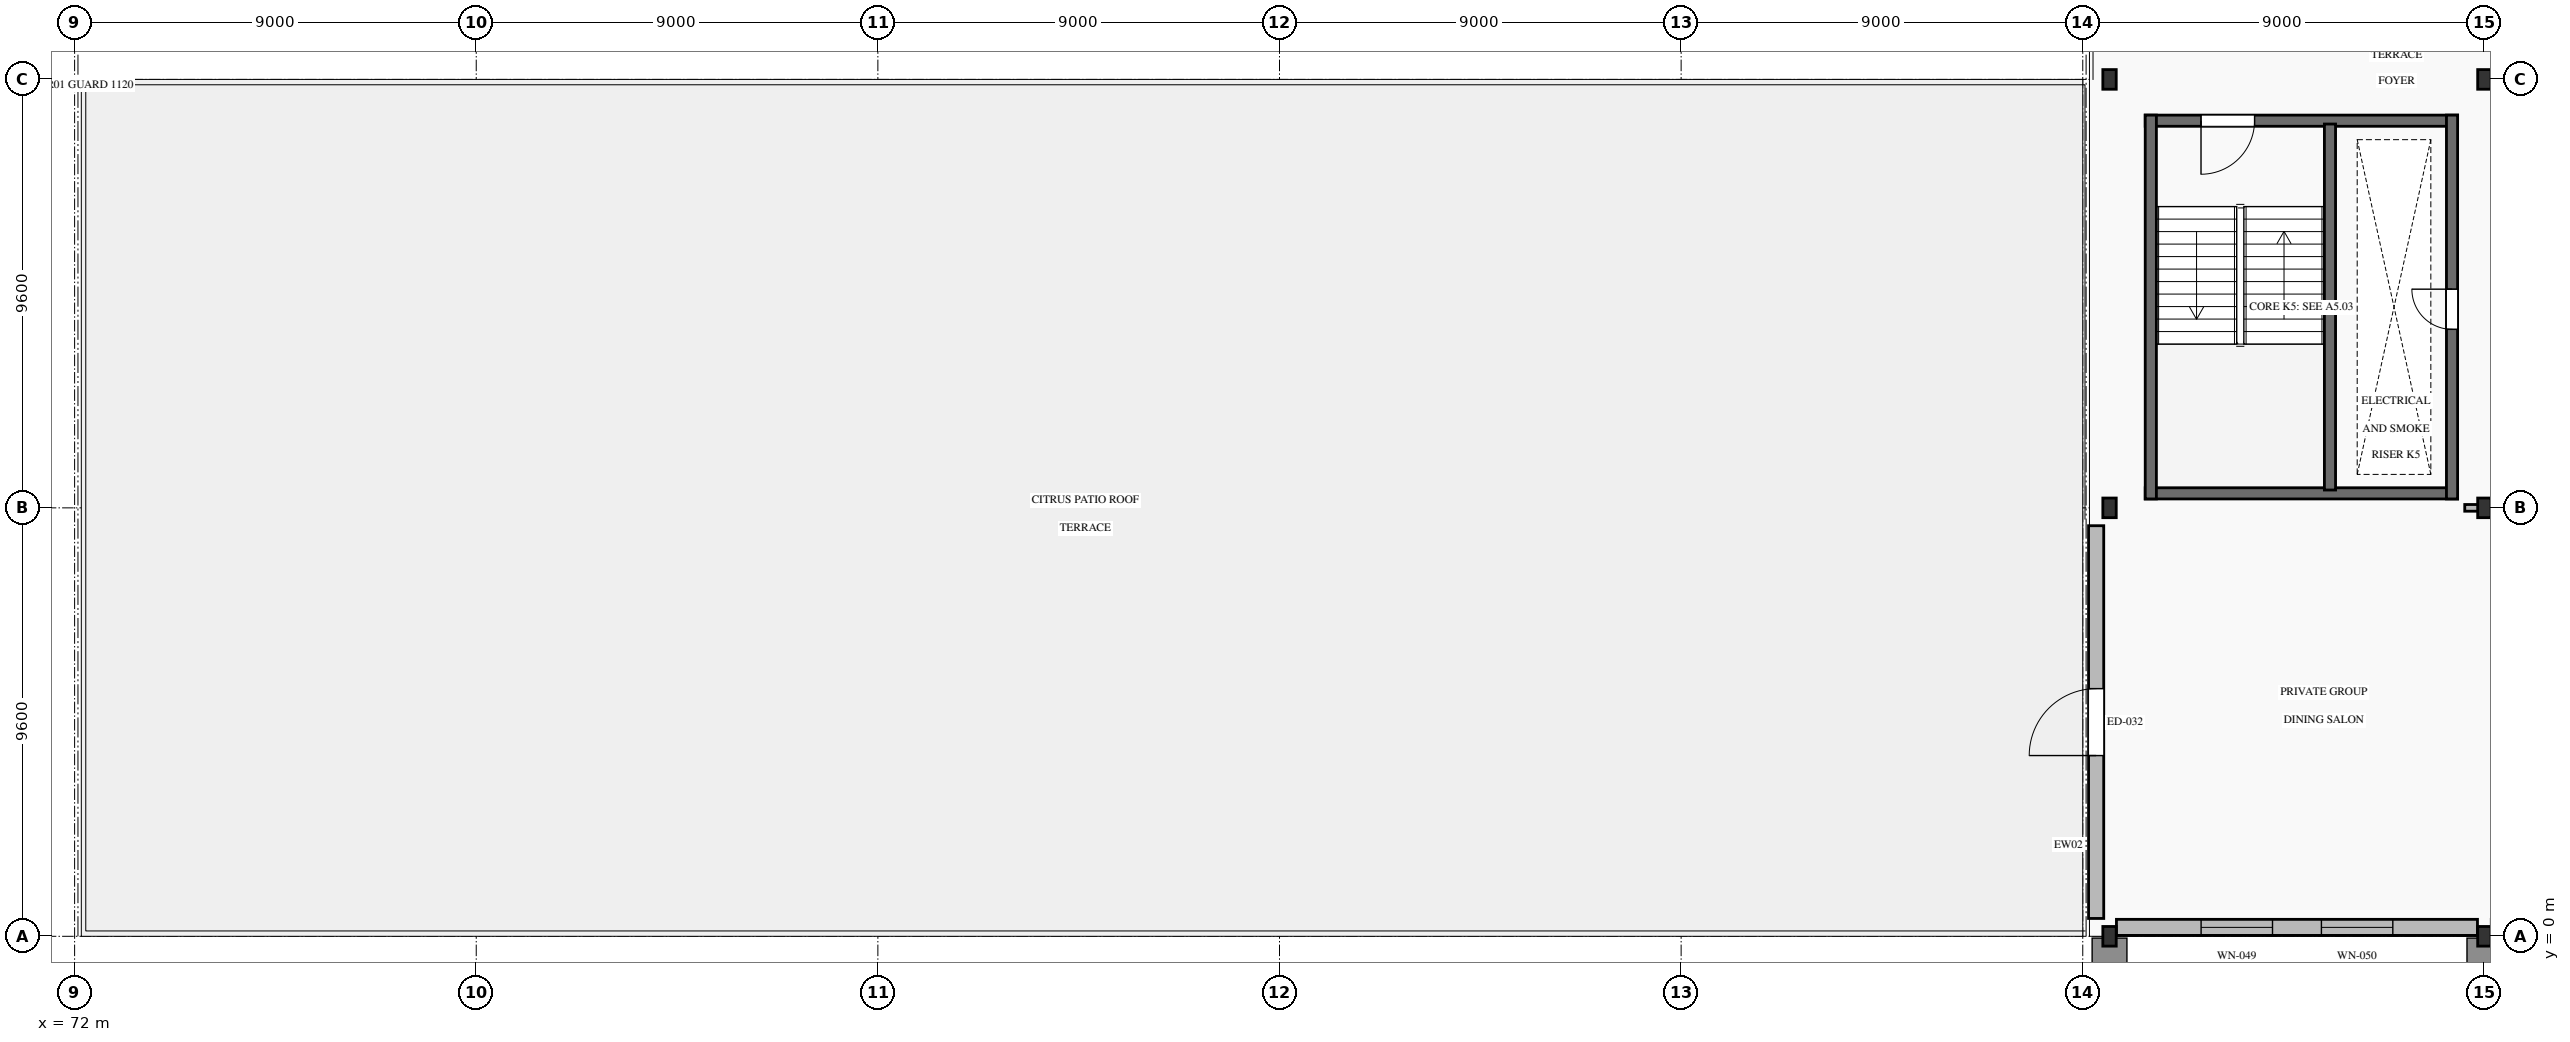
"""IFC4 building model, lengths in metres.
Left out: names, types, materials, properties, quantities, classifications, styles, units other than length and angle.
Written with IfcOpenShell. Run it as: python <this file> out.ifc"""

import sys

from ifc_helpers import new_model, si_unit, direction, frame, frame_2d, origin, origin_2d, place, context, subcontext, project, spatial, rectangle, i_section, extrude, element, fill, save


model = new_model("IFC4")
c1 = context("Model", 3, precision=1e-05, world=origin(), true_north=direction((0.0, 1.0)))
c2 = subcontext(c1, "Body", "Model", "MODEL_VIEW")
j1 = project(units=[si_unit("LENGTHUNIT", "METRE"), si_unit("PLANEANGLEUNIT", "RADIAN")], contexts=[c1])
p1 = place(None, origin())
s1 = spatial("IfcSite", under=j1, at=p1, CompositionType="ELEMENT")
p2 = place(p1, origin())
s2 = spatial("IfcBuilding", under=s1, at=p2, CompositionType="ELEMENT")
p3 = place(p2, frame((0.0, 0.0, 10.8)))
s3 = spatial("IfcBuildingStorey", under=s2, at=p3, CompositionType="ELEMENT", Elevation=10.8)
for number, where, z_axis, x_axis in (
    (1, (117.6, 0.0, 0.0), (0.0, 0.0, 1.0), (1.0, 0.0, 0.0)),
    (2, (117.6, 9.6, 0.0), (0.0, 0.0, 1.0), (1.0, 0.0, 0.0)),
    (3, (117.6, 19.2, 0.0), (0.0, 0.0, 1.0), (1.0, 0.0, 0.0)),
    (4, (126.0, 0.0, 0.0), (0.0, 0.0, 1.0), (1.0, 0.0, 0.0)),
    (5, (126.0, 9.6, 0.0), (0.0, 0.0, 1.0), (1.0, 0.0, 0.0)),
    (6, (126.0, 19.2, 0.0), (0.0, 0.0, 1.0), (1.0, 0.0, 0.0)),
):
    element("IfcColumn", number, at=place(p3, frame(where, z_axis=z_axis, x_axis=x_axis)), inside=s3, PredefinedType="COLUMN", context=c2, shape_type="SweptSolid", body=[
        extrude(i_section(OverallWidth=0.3, OverallDepth=0.44, WebThickness=0.011, FlangeThickness=0.021, FilletRadius=0.027, at=origin_2d()), origin(), (0.0, 0.0, 1.0), 4.2),
    ])
p4 = place(p3, frame((117.755, 0.2, 0.0), z_axis=(0.0, 0.0, 1.0), x_axis=(1.0, 0.0, 0.0)))
e7 = element("IfcWall", 7, at=p4, inside=s3, PredefinedType="SOLIDWALL", context=c2, shape_type="SweptSolid", body=[
    extrude(rectangle(XDim=8.09, YDim=0.36, at=frame_2d((4.045, 0.0))), origin(), (0.0, 0.0, 1.0), 3.69),
])
p5 = place(p4, frame((1.897, 0.0, 0.95)))
e8 = element("IfcOpeningElement", 8, at=p5, cuts=e7, PredefinedType="OPENING", context=c2, shape_type="SweptSolid", body=[
    extrude(rectangle(XDim=1.6, YDim=2.2, at=frame_2d((0.8, 1.1))), frame((0.0, 0.195, 0.0), z_axis=(0.0, -1.0, 0.0), x_axis=(1.0, 0.0, 0.0)), (0.0, 0.0, 1.0), 0.39),
])
p6 = place(p4, frame((4.593, 0.0, 0.95)))
e9 = element("IfcOpeningElement", 9, at=p6, cuts=e7, PredefinedType="OPENING", context=c2, shape_type="SweptSolid", body=[
    extrude(rectangle(XDim=1.6, YDim=2.2, at=frame_2d((0.8, 1.1))), frame((0.0, 0.195, 0.0), z_axis=(0.0, -1.0, 0.0), x_axis=(1.0, 0.0, 0.0)), (0.0, 0.0, 1.0), 0.39),
])
p7 = place(p3, frame((117.3, 0.4, 0.0), z_axis=(0.0, 0.0, 1.0), x_axis=(0.0, 1.0, 0.0)))
e10 = element("IfcWall", 10, at=p7, inside=s3, PredefinedType="SOLIDWALL", context=c2, shape_type="SweptSolid", body=[
    extrude(rectangle(XDim=8.8, YDim=0.34, at=frame_2d((4.4, 0.0))), origin(), (0.0, 0.0, 1.0), 3.49),
])
p8 = place(p7, frame((3.65, 0.0, 0.0)))
e11 = element("IfcOpeningElement", 11, at=p8, cuts=e10, PredefinedType="OPENING", context=c2, shape_type="SweptSolid", body=[
    extrude(rectangle(XDim=1.5, YDim=2.25, at=frame_2d((0.75, 1.125))), frame((0.0, 0.185, 0.0), z_axis=(0.0, -1.0, 0.0), x_axis=(1.0, 0.0, 0.0)), (0.0, 0.0, 1.0), 0.37),
])
p9 = place(p3, frame((118.4, 9.925, 0.0), z_axis=(0.0, 0.0, 1.0), x_axis=(1.0, 0.0, 0.0)))
e12 = element("IfcWall", 12, at=p9, inside=s3, PredefinedType="SHEAR", context=c2, shape_type="SweptSolid", body=[
    extrude(rectangle(XDim=7.0, YDim=0.25, at=frame_2d((3.5, 0.0))), origin(), (0.0, 0.0, 1.0), 4.2),
])
p10 = place(p3, frame((118.4, 18.275, 0.0), z_axis=(0.0, 0.0, 1.0), x_axis=(1.0, 0.0, 0.0)))
e13 = element("IfcWall", 13, at=p10, inside=s3, PredefinedType="SHEAR", context=c2, shape_type="SweptSolid", body=[
    extrude(rectangle(XDim=7.0, YDim=0.25, at=frame_2d((3.5, 0.0))), origin(), (0.0, 0.0, 1.0), 4.2),
])
p11 = place(p10, frame((1.25, 0.0, 0.0)))
e14 = element("IfcOpeningElement", 14, at=p11, cuts=e13, PredefinedType="OPENING", context=c2, shape_type="SweptSolid", body=[
    extrude(rectangle(XDim=1.2, YDim=2.15, at=frame_2d((0.6, 1.075))), frame((0.0, 0.14, 0.0), z_axis=(0.0, -1.0, 0.0), x_axis=(1.0, 0.0, 0.0)), (0.0, 0.0, 1.0), 0.28),
])
p12 = place(p3, frame((118.525, 9.8, 0.0), z_axis=(0.0, 0.0, 1.0), x_axis=(0.0, 1.0, 0.0)))
e15 = element("IfcWall", 15, at=p12, inside=s3, PredefinedType="SHEAR", context=c2, shape_type="SweptSolid", body=[
    extrude(rectangle(XDim=8.6, YDim=0.25, at=frame_2d((4.3, 0.0))), origin(), (0.0, 0.0, 1.0), 4.2),
])
p13 = place(p3, frame((125.275, 9.8, 0.0), z_axis=(0.0, 0.0, 1.0), x_axis=(0.0, 1.0, 0.0)))
e16 = element("IfcWall", 16, at=p13, inside=s3, PredefinedType="SHEAR", context=c2, shape_type="SweptSolid", body=[
    extrude(rectangle(XDim=8.6, YDim=0.25, at=frame_2d((4.3, 0.0))), origin(), (0.0, 0.0, 1.0), 4.2),
])
p14 = place(p13, frame((3.8, 0.0, 0.0)))
e17 = element("IfcOpeningElement", 17, at=p14, cuts=e16, PredefinedType="OPENING", context=c2, shape_type="SweptSolid", body=[
    extrude(rectangle(XDim=0.9, YDim=2.05, at=frame_2d((0.45, 1.025))), frame((0.0, 0.14, 0.0), z_axis=(0.0, -1.0, 0.0), x_axis=(1.0, 0.0, 0.0)), (0.0, 0.0, 1.0), 0.28),
])
p15 = place(p3, frame((122.54, 10.0, 0.0), z_axis=(0.0, 0.0, 1.0), x_axis=(0.0, 1.0, 0.0)))
e18 = element("IfcWall", 18, at=p15, inside=s3, PredefinedType="SHEAR", context=c2, shape_type="SweptSolid", body=[
    extrude(rectangle(XDim=8.2, YDim=0.25, at=frame_2d((4.1, 0.0))), origin(), (0.0, 0.0, 1.0), 4.2),
])
p16 = place(p3, frame((125.56, 9.6, 0.0), z_axis=(0.0, 0.0, 1.0), x_axis=(1.0, 0.0, 0.0)))
e19 = element("IfcWall", 19, at=p16, inside=s3, PredefinedType="PARTITIONING", context=c2, shape_type="SweptSolid", body=[
    extrude(rectangle(XDim=9.69, YDim=0.15, at=frame_2d((4.845, 0.0))), origin(), (0.0, 0.0, 1.0), 3.64),
])
p17 = place(p16, frame((4.345, 0.0, 0.0)))
e20 = element("IfcOpeningElement", 20, at=p17, cuts=e19, PredefinedType="OPENING", context=c2, shape_type="SweptSolid", body=[
    extrude(rectangle(XDim=1.0, YDim=2.15, at=frame_2d((0.5, 1.075))), frame((0.0, 0.09, 0.0), z_axis=(0.0, -1.0, 0.0), x_axis=(1.0, 0.0, 0.0)), (0.0, 0.0, 1.0), 0.18),
])
p18 = place(p5, origin())
e21 = element("IfcWindow", 21, at=p18, inside=s3, PartitioningType="SINGLE_PANEL", PredefinedType="WINDOW", context=c2, shape_type="SweptSolid", body=[
    extrude(rectangle(XDim=1.6, YDim=2.2, at=frame_2d((0.8, 1.1))), frame((0.0, 0.03, 0.0), z_axis=(0.0, -1.0, 0.0), x_axis=(1.0, 0.0, 0.0)), (0.0, 0.0, 1.0), 0.06),
])
fill(e8, e21)
p19 = place(p6, origin())
e22 = element("IfcWindow", 22, at=p19, inside=s3, PartitioningType="SINGLE_PANEL", PredefinedType="WINDOW", context=c2, shape_type="SweptSolid", body=[
    extrude(rectangle(XDim=1.6, YDim=2.2, at=frame_2d((0.8, 1.1))), frame((0.0, 0.03, 0.0), z_axis=(0.0, -1.0, 0.0), x_axis=(1.0, 0.0, 0.0)), (0.0, 0.0, 1.0), 0.06),
])
fill(e9, e22)
p20 = place(p8, origin())
e23 = element("IfcDoor", 23, at=p20, inside=s3, OperationType="SINGLE_SWING_LEFT", PredefinedType="DOOR", context=c2, shape_type="SweptSolid", body=[
    extrude(rectangle(XDim=1.5, YDim=2.25, at=frame_2d((0.75, 1.125))), frame((0.0, 0.025, 0.0), z_axis=(0.0, -1.0, 0.0), x_axis=(1.0, 0.0, 0.0)), (0.0, 0.0, 1.0), 0.05),
])
fill(e11, e23)
p21 = place(p11, frame((1.2, 0.0, 0.0), z_axis=(0.0, 0.0, 1.0), x_axis=(-1.0, 0.0, 0.0)))
e24 = element("IfcDoor", 24, at=p21, inside=s3, OperationType="SINGLE_SWING_LEFT", PredefinedType="DOOR", context=c2, shape_type="SweptSolid", body=[
    extrude(rectangle(XDim=1.2, YDim=2.15, at=frame_2d((0.6, 1.075))), frame((0.0, 0.025, 0.0), z_axis=(0.0, -1.0, 0.0), x_axis=(1.0, 0.0, 0.0)), (0.0, 0.0, 1.0), 0.05),
])
fill(e14, e24)
p22 = place(p14, origin())
e25 = element("IfcDoor", 25, at=p22, inside=s3, OperationType="SINGLE_SWING_RIGHT", PredefinedType="DOOR", context=c2, shape_type="SweptSolid", body=[
    extrude(rectangle(XDim=0.9, YDim=2.05, at=frame_2d((0.45, 1.025))), frame((0.0, 0.025, 0.0), z_axis=(0.0, -1.0, 0.0), x_axis=(1.0, 0.0, 0.0)), (0.0, 0.0, 1.0), 0.05),
])
fill(e17, e25)
save(model, sys.argv[1])
